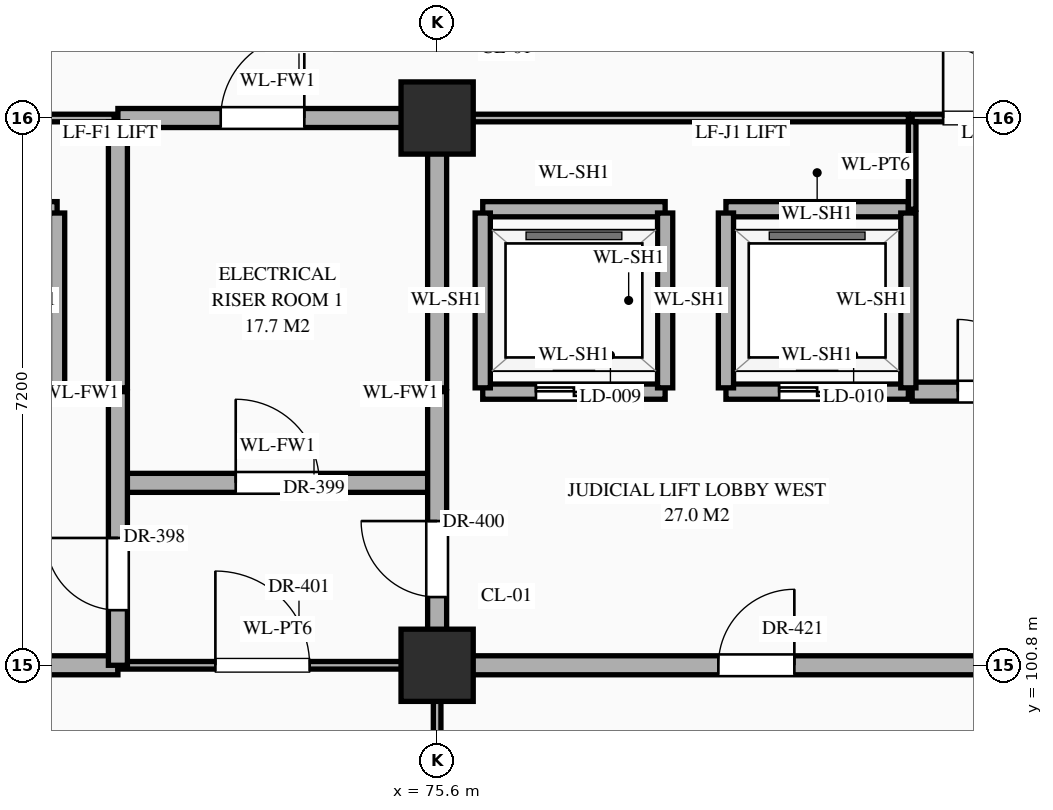
"""IFC4 building model, lengths in metres.
Left out: names, types, materials, properties, quantities, classifications, styles, units other than length and angle.
Written with IfcOpenShell. Run it as: python <this file> out.ifc"""

import sys

from ifc_helpers import new_model, si_unit, direction, frame, frame_2d, origin, origin_2d, place, context, subcontext, project, spatial, rectangle, extrude, element, fill, save


model = new_model("IFC4")
c1 = context("Model", 3, precision=1e-05, world=origin(), true_north=direction((0.0, 1.0)))
c2 = subcontext(c1, "Body", "Model", "MODEL_VIEW")
j1 = project(units=[si_unit("LENGTHUNIT", "METRE"), si_unit("PLANEANGLEUNIT", "RADIAN")], contexts=[c1])
p1 = place(None, origin())
s1 = spatial("IfcSite", under=j1, at=p1, CompositionType="ELEMENT")
p2 = place(p1, origin())
s2 = spatial("IfcBuilding", under=s1, at=p2, CompositionType="ELEMENT")
p3 = place(p2, frame((0.0, 0.0, -5.4)))
s3 = spatial("IfcBuildingStorey", under=s2, at=p3, CompositionType="ELEMENT", Elevation=-5.4)
for number, where, z_axis, x_axis in (
    (1, (75.6, 100.8, 0.0), (0.0, 0.0, 1.0), (1.0, 0.0, 0.0)),
    (2, (75.6, 108.0, 0.0), (0.0, 0.0, 1.0), (1.0, 0.0, 0.0)),
):
    element("IfcColumn", number, at=place(p3, frame(where, z_axis=z_axis, x_axis=x_axis)), inside=s3, PredefinedType="COLUMN", context=c2, shape_type="SweptSolid", body=[
        extrude(rectangle(XDim=0.95, YDim=0.95, at=origin_2d()), origin(), (0.0, 0.0, 1.0), 5.4),
    ])
p4 = place(p3, frame((58.8, 100.8, 0.0), z_axis=(0.0, 0.0, 1.0), x_axis=(1.0, 0.0, 0.0)))
e3 = element("IfcWall", 3, at=p4, inside=s3, PredefinedType="STANDARD", context=c2, shape_type="SweptSolid", body=[
    extrude(rectangle(XDim=12.6, YDim=0.25, at=frame_2d((6.3, 0.0))), origin(), (0.0, 0.0, 1.0), 4.25),
])
p5 = place(p4, frame((3.725, 0.0, 0.0)))
e4 = element("IfcOpeningElement", 4, at=p5, cuts=e3, PredefinedType="OPENING", context=c2, shape_type="SweptSolid", body=[
    extrude(rectangle(XDim=0.95, YDim=2.15, at=frame_2d((0.475, 1.075))), frame((0.0, 0.137, 0.0), z_axis=(0.0, -1.0, 0.0), x_axis=(1.0, 0.0, 0.0)), (0.0, 0.0, 1.0), 0.274),
])
p6 = place(p3, frame((71.4, 100.8, 0.0), z_axis=(0.0, 0.0, 1.0), x_axis=(1.0, 0.0, 0.0)))
e5 = element("IfcWall", 5, at=p6, inside=s3, PredefinedType="STANDARD", context=c2, shape_type="SweptSolid", body=[
    extrude(rectangle(XDim=4.2, YDim=0.1, at=frame_2d((2.1, 0.0))), origin(), (0.0, 0.0, 1.0), 4.25),
])
p7 = place(p6, frame((1.282, 0.0, 0.0)))
e6 = element("IfcOpeningElement", 6, at=p7, cuts=e5, PredefinedType="OPENING", context=c2, shape_type="SweptSolid", body=[
    extrude(rectangle(XDim=1.24, YDim=2.3, at=frame_2d((0.62, 1.15))), frame((0.0, 0.062, 0.0), z_axis=(0.0, -1.0, 0.0), x_axis=(1.0, 0.0, 0.0)), (0.0, 0.0, 1.0), 0.124),
])
p8 = place(p3, frame((75.6, 100.8, 0.0), z_axis=(0.0, 0.0, 1.0), x_axis=(1.0, 0.0, 0.0)))
e7 = element("IfcWall", 7, at=p8, inside=s3, PredefinedType="STANDARD", context=c2, shape_type="SweptSolid", body=[
    extrude(rectangle(XDim=16.8, YDim=0.25, at=frame_2d((8.4, 0.0))), origin(), (0.0, 0.0, 1.0), 4.25),
])
p9 = place(p8, frame((3.7, 0.0, 0.0)))
e8 = element("IfcOpeningElement", 8, at=p9, cuts=e7, PredefinedType="OPENING", context=c2, shape_type="SweptSolid", body=[
    extrude(rectangle(XDim=1.0, YDim=2.2, at=frame_2d((0.5, 1.1))), frame((0.0, 0.137, 0.0), z_axis=(0.0, -1.0, 0.0), x_axis=(1.0, 0.0, 0.0)), (0.0, 0.0, 1.0), 0.274),
])
p10 = place(p8, frame((9.748, 0.0, 0.0)))
e9 = element("IfcOpeningElement", 9, at=p10, cuts=e7, PredefinedType="OPENING", context=c2, shape_type="SweptSolid", body=[
    extrude(rectangle(XDim=1.1, YDim=2.2, at=frame_2d((0.55, 1.1))), frame((0.0, 0.137, 0.0), z_axis=(0.0, -1.0, 0.0), x_axis=(1.0, 0.0, 0.0)), (0.0, 0.0, 1.0), 0.274),
])
p11 = place(p8, frame((12.5, 0.0, 0.0)))
e10 = element("IfcOpeningElement", 10, at=p11, cuts=e7, PredefinedType="OPENING", context=c2, shape_type="SweptSolid", body=[
    extrude(rectangle(XDim=1.0, YDim=2.2, at=frame_2d((0.5, 1.1))), frame((0.0, 0.137, 0.0), z_axis=(0.0, -1.0, 0.0), x_axis=(1.0, 0.0, 0.0)), (0.0, 0.0, 1.0), 0.274),
])
p12 = place(p8, frame((14.827, 0.0, 0.0)))
e11 = element("IfcOpeningElement", 11, at=p12, cuts=e7, PredefinedType="OPENING", context=c2, shape_type="SweptSolid", body=[
    extrude(rectangle(XDim=0.95, YDim=2.15, at=frame_2d((0.475, 1.075))), frame((0.0, 0.137, 0.0), z_axis=(0.0, -1.0, 0.0), x_axis=(1.0, 0.0, 0.0)), (0.0, 0.0, 1.0), 0.274),
])
p13 = place(p3, frame((71.4, 103.2, 0.0), z_axis=(0.0, 0.0, 1.0), x_axis=(1.0, 0.0, 0.0)))
e12 = element("IfcWall", 12, at=p13, inside=s3, PredefinedType="STANDARD", context=c2, shape_type="SweptSolid", body=[
    extrude(rectangle(XDim=4.2, YDim=0.25, at=frame_2d((2.1, 0.0))), origin(), (0.0, 0.0, 1.0), 5.1),
])
p14 = place(p13, frame((1.55, 0.0, 0.0)))
e13 = element("IfcOpeningElement", 13, at=p14, cuts=e12, PredefinedType="OPENING", context=c2, shape_type="SweptSolid", body=[
    extrude(rectangle(XDim=1.1, YDim=2.2, at=frame_2d((0.55, 1.1))), frame((0.0, 0.137, 0.0), z_axis=(0.0, -1.0, 0.0), x_axis=(1.0, 0.0, 0.0)), (0.0, 0.0, 1.0), 0.274),
])
p15 = place(p3, frame((67.6, 104.4, 0.0), z_axis=(0.0, 0.0, 1.0), x_axis=(1.0, 0.0, 0.0)))
e14 = element("IfcWall", 14, at=p15, inside=s3, PredefinedType="STANDARD", context=c2, shape_type="SweptSolid", body=[
    extrude(rectangle(XDim=3.0, YDim=0.2, at=frame_2d((1.5, 0.0))), origin(), (0.0, 0.0, 1.0), 5.1),
])
p16 = place(p15, frame((0.9, 0.0, 0.0)))
e15 = element("IfcOpeningElement", 15, at=p16, cuts=e14, PredefinedType="OPENING", context=c2, shape_type="SweptSolid", body=[
    extrude(rectangle(XDim=1.2, YDim=2.15, at=frame_2d((0.6, 1.075))), frame((0.0, 0.112, 0.0), z_axis=(0.0, -1.0, 0.0), x_axis=(1.0, 0.0, 0.0)), (0.0, 0.0, 1.0), 0.224),
])
p17 = place(p3, frame((76.2, 104.4, 0.0), z_axis=(0.0, 0.0, 1.0), x_axis=(1.0, 0.0, 0.0)))
e16 = element("IfcWall", 16, at=p17, inside=s3, PredefinedType="STANDARD", context=c2, shape_type="SweptSolid", body=[
    extrude(rectangle(XDim=2.4, YDim=0.2, at=frame_2d((1.2, 0.0))), origin(), (0.0, 0.0, 1.0), 5.1),
])
p18 = place(p17, frame((0.7, 0.0, 0.0)))
e17 = element("IfcOpeningElement", 17, at=p18, cuts=e16, PredefinedType="OPENING", context=c2, shape_type="SweptSolid", body=[
    extrude(rectangle(XDim=1.0, YDim=2.15, at=frame_2d((0.5, 1.075))), frame((0.0, 0.112, 0.0), z_axis=(0.0, -1.0, 0.0), x_axis=(1.0, 0.0, 0.0)), (0.0, 0.0, 1.0), 0.224),
])
p19 = place(p3, frame((79.4, 104.4, 0.0), z_axis=(0.0, 0.0, 1.0), x_axis=(1.0, 0.0, 0.0)))
e18 = element("IfcWall", 18, at=p19, inside=s3, PredefinedType="STANDARD", context=c2, shape_type="SweptSolid", body=[
    extrude(rectangle(XDim=2.4, YDim=0.2, at=frame_2d((1.2, 0.0))), origin(), (0.0, 0.0, 1.0), 5.1),
])
p20 = place(p19, frame((0.7, 0.0, 0.0)))
e19 = element("IfcOpeningElement", 19, at=p20, cuts=e18, PredefinedType="OPENING", context=c2, shape_type="SweptSolid", body=[
    extrude(rectangle(XDim=1.0, YDim=2.15, at=frame_2d((0.5, 1.075))), frame((0.0, 0.112, 0.0), z_axis=(0.0, -1.0, 0.0), x_axis=(1.0, 0.0, 0.0)), (0.0, 0.0, 1.0), 0.224),
])
p21 = place(p3, frame((81.85, 104.4, 0.0), z_axis=(0.0, 0.0, 1.0), x_axis=(1.0, 0.0, 0.0)))
e20 = element("IfcWall", 20, at=p21, inside=s3, PredefinedType="STANDARD", context=c2, shape_type="SweptSolid", body=[
    extrude(rectangle(XDim=4.3, YDim=0.25, at=frame_2d((2.15, 0.0))), origin(), (0.0, 0.0, 1.0), 5.1),
])
p22 = place(p21, frame((0.6, 0.0, 0.0)))
e21 = element("IfcOpeningElement", 21, at=p22, cuts=e20, PredefinedType="OPENING", context=c2, shape_type="SweptSolid", body=[
    extrude(rectangle(XDim=0.95, YDim=2.15, at=frame_2d((0.475, 1.075))), frame((0.0, 0.137, 0.0), z_axis=(0.0, -1.0, 0.0), x_axis=(1.0, 0.0, 0.0)), (0.0, 0.0, 1.0), 0.274),
])
p23 = place(p21, frame((2.675, 0.0, 0.0)))
e22 = element("IfcOpeningElement", 22, at=p23, cuts=e20, PredefinedType="OPENING", context=c2, shape_type="SweptSolid", body=[
    extrude(rectangle(XDim=1.1, YDim=2.2, at=frame_2d((0.55, 1.1))), frame((0.0, 0.137, 0.0), z_axis=(0.0, -1.0, 0.0), x_axis=(1.0, 0.0, 0.0)), (0.0, 0.0, 1.0), 0.274),
])
p24 = place(p3, frame((67.6, 106.8, 0.0), z_axis=(0.0, 0.0, 1.0), x_axis=(1.0, 0.0, 0.0)))
e23 = element("IfcWall", 23, at=p24, inside=s3, PredefinedType="STANDARD", context=c2, shape_type="SweptSolid", body=[
    extrude(rectangle(XDim=3.0, YDim=0.2, at=frame_2d((1.5, 0.0))), origin(), (0.0, 0.0, 1.0), 5.1),
])
for number, where, z_axis, x_axis in (
    (24, (76.2, 106.8, 0.0), (0.0, 0.0, 1.0), (1.0, 0.0, 0.0)),
    (25, (79.4, 106.8, 0.0), (0.0, 0.0, 1.0), (1.0, 0.0, 0.0)),
):
    element("IfcWall", number, at=place(p3, frame(where, z_axis=z_axis, x_axis=x_axis)), inside=s3, PredefinedType="STANDARD", context=c2, shape_type="SweptSolid", body=[
        extrude(rectangle(XDim=2.4, YDim=0.2, at=frame_2d((1.2, 0.0))), origin(), (0.0, 0.0, 1.0), 5.1),
    ])
p25 = place(p3, frame((67.25, 108.0, 0.0), z_axis=(0.0, 0.0, 1.0), x_axis=(1.0, 0.0, 0.0)))
e26 = element("IfcWall", 26, at=p25, inside=s3, PredefinedType="STANDARD", context=c2, shape_type="SweptSolid", body=[
    extrude(rectangle(XDim=4.1, YDim=0.1, at=frame_2d((2.05, 0.0))), origin(), (0.0, 0.0, 1.0), 4.25),
])
p26 = place(p3, frame((71.4, 108.0, 0.0), z_axis=(0.0, 0.0, 1.0), x_axis=(1.0, 0.0, 0.0)))
e27 = element("IfcWall", 27, at=p26, inside=s3, PredefinedType="STANDARD", context=c2, shape_type="SweptSolid", body=[
    extrude(rectangle(XDim=4.2, YDim=0.25, at=frame_2d((2.1, 0.0))), origin(), (0.0, 0.0, 1.0), 4.25),
])
p27 = place(p26, frame((1.353, 0.0, 0.0)))
e28 = element("IfcOpeningElement", 28, at=p27, cuts=e27, PredefinedType="OPENING", context=c2, shape_type="SweptSolid", body=[
    extrude(rectangle(XDim=1.1, YDim=2.2, at=frame_2d((0.55, 1.1))), frame((0.0, 0.137, 0.0), z_axis=(0.0, -1.0, 0.0), x_axis=(1.0, 0.0, 0.0)), (0.0, 0.0, 1.0), 0.274),
])
p28 = place(p3, frame((75.65, 108.0, 0.0), z_axis=(0.0, 0.0, 1.0), x_axis=(1.0, 0.0, 0.0)))
e29 = element("IfcWall", 29, at=p28, inside=s3, PredefinedType="STANDARD", context=c2, shape_type="SweptSolid", body=[
    extrude(rectangle(XDim=6.15, YDim=0.1, at=frame_2d((3.075, 0.0))), origin(), (0.0, 0.0, 1.0), 4.25),
])
p29 = place(p3, frame((81.85, 108.0, 0.0), z_axis=(0.0, 0.0, 1.0), x_axis=(1.0, 0.0, 0.0)))
e30 = element("IfcWall", 30, at=p29, inside=s3, PredefinedType="STANDARD", context=c2, shape_type="SweptSolid", body=[
    extrude(rectangle(XDim=4.3, YDim=0.1, at=frame_2d((2.15, 0.0))), origin(), (0.0, 0.0, 1.0), 4.25),
])
p30 = place(p29, frame((0.407, 0.0, 0.0)))
e31 = element("IfcOpeningElement", 31, at=p30, cuts=e30, PredefinedType="OPENING", context=c2, shape_type="SweptSolid", body=[
    extrude(rectangle(XDim=0.94, YDim=2.3, at=frame_2d((0.47, 1.15))), frame((0.0, 0.062, 0.0), z_axis=(0.0, -1.0, 0.0), x_axis=(1.0, 0.0, 0.0)), (0.0, 0.0, 1.0), 0.124),
])
p31 = place(p29, frame((2.933, 0.0, 0.0)))
e32 = element("IfcOpeningElement", 32, at=p31, cuts=e30, PredefinedType="OPENING", context=c2, shape_type="SweptSolid", body=[
    extrude(rectangle(XDim=0.98, YDim=2.35, at=frame_2d((0.49, 1.175))), frame((0.0, 0.062, 0.0), z_axis=(0.0, -1.0, 0.0), x_axis=(1.0, 0.0, 0.0)), (0.0, 0.0, 1.0), 0.124),
])
p32 = place(p3, frame((70.6, 104.45, 0.0), z_axis=(0.0, 0.0, 1.0), x_axis=(0.0, 1.0, 0.0)))
e33 = element("IfcWall", 33, at=p32, inside=s3, PredefinedType="STANDARD", context=c2, shape_type="SweptSolid", body=[
    extrude(rectangle(XDim=2.3, YDim=0.2, at=frame_2d((1.15, 0.0))), origin(), (0.0, 0.0, 1.0), 5.1),
])
p33 = place(p3, frame((71.4, 100.8, 0.0), z_axis=(0.0, 0.0, 1.0), x_axis=(0.0, 1.0, 0.0)))
e34 = element("IfcWall", 34, at=p33, inside=s3, PredefinedType="STANDARD", context=c2, shape_type="SweptSolid", body=[
    extrude(rectangle(XDim=3.6, YDim=0.25, at=frame_2d((1.8, 0.0))), origin(), (0.0, 0.0, 1.0), 4.55),
])
p34 = place(p33, frame((0.725, 0.0, 0.0)))
e35 = element("IfcOpeningElement", 35, at=p34, cuts=e34, PredefinedType="OPENING", context=c2, shape_type="SweptSolid", body=[
    extrude(rectangle(XDim=0.95, YDim=2.15, at=frame_2d((0.475, 1.075))), frame((0.0, 0.137, 0.0), z_axis=(0.0, -1.0, 0.0), x_axis=(1.0, 0.0, 0.0)), (0.0, 0.0, 1.0), 0.274),
])
p35 = place(p3, frame((71.4, 104.45, 0.0), z_axis=(0.0, 0.0, 1.0), x_axis=(0.0, 1.0, 0.0)))
e36 = element("IfcWall", 36, at=p35, inside=s3, PredefinedType="STANDARD", context=c2, shape_type="SweptSolid", body=[
    extrude(rectangle(XDim=3.5, YDim=0.25, at=frame_2d((1.75, 0.0))), origin(), (0.0, 0.0, 1.0), 4.55),
])
p36 = place(p3, frame((75.6, 96.0, 0.0), z_axis=(0.0, 0.0, 1.0), x_axis=(0.0, 1.0, 0.0)))
e37 = element("IfcWall", 37, at=p36, inside=s3, PredefinedType="STANDARD", context=c2, shape_type="SweptSolid", body=[
    extrude(rectangle(XDim=4.8, YDim=0.1, at=frame_2d((2.4, 0.0))), origin(), (0.0, 0.0, 1.0), 4.35),
])
p37 = place(p3, frame((75.6, 100.8, 0.0), z_axis=(0.0, 0.0, 1.0), x_axis=(0.0, 1.0, 0.0)))
e38 = element("IfcWall", 38, at=p37, inside=s3, PredefinedType="STANDARD", context=c2, shape_type="SweptSolid", body=[
    extrude(rectangle(XDim=3.6, YDim=0.25, at=frame_2d((1.8, 0.0))), origin(), (0.0, 0.0, 1.0), 4.35),
])
p38 = place(p37, frame((0.897, 0.0, 0.0)))
e39 = element("IfcOpeningElement", 39, at=p38, cuts=e38, PredefinedType="OPENING", context=c2, shape_type="SweptSolid", body=[
    extrude(rectangle(XDim=1.0, YDim=2.2, at=frame_2d((0.5, 1.1))), frame((0.0, 0.137, 0.0), z_axis=(0.0, -1.0, 0.0), x_axis=(1.0, 0.0, 0.0)), (0.0, 0.0, 1.0), 0.274),
])
p39 = place(p3, frame((75.6, 104.45, 0.0), z_axis=(0.0, 0.0, 1.0), x_axis=(0.0, 1.0, 0.0)))
e40 = element("IfcWall", 40, at=p39, inside=s3, PredefinedType="STANDARD", context=c2, shape_type="SweptSolid", body=[
    extrude(rectangle(XDim=3.5, YDim=0.25, at=frame_2d((1.75, 0.0))), origin(), (0.0, 0.0, 1.0), 4.35),
])
for number, where, z_axis, x_axis in (
    (41, (76.2, 104.45, 0.0), (0.0, 0.0, 1.0), (0.0, 1.0, 0.0)),
    (42, (78.6, 104.45, 0.0), (0.0, 0.0, 1.0), (0.0, 1.0, 0.0)),
    (43, (79.4, 104.45, 0.0), (0.0, 0.0, 1.0), (0.0, 1.0, 0.0)),
    (44, (81.8, 104.45, 0.0), (0.0, 0.0, 1.0), (0.0, 1.0, 0.0)),
):
    element("IfcWall", number, at=place(p3, frame(where, z_axis=z_axis, x_axis=x_axis)), inside=s3, PredefinedType="STANDARD", context=c2, shape_type="SweptSolid", body=[
        extrude(rectangle(XDim=2.3, YDim=0.2, at=frame_2d((1.15, 0.0))), origin(), (0.0, 0.0, 1.0), 5.1),
    ])
p40 = place(p3, frame((81.85, 106.8, 0.0), z_axis=(0.0, 0.0, 1.0), x_axis=(0.0, 1.0, 0.0)))
e45 = element("IfcWall", 45, at=p40, inside=s3, PredefinedType="STANDARD", context=c2, shape_type="SweptSolid", body=[
    extrude(rectangle(XDim=1.15, YDim=0.1, at=frame_2d((0.575, 0.0))), origin(), (0.0, 0.0, 1.0), 5.1),
])
p41 = place(p18, origin())
e46 = element("IfcDoor", 46, at=p41, inside=s3, OperationType="DOUBLE_DOOR_SLIDING", PredefinedType="DOOR", context=c2, shape_type="SweptSolid", body=[
    extrude(rectangle(XDim=1.0, YDim=2.15, at=frame_2d((0.5, 1.075))), frame((0.0, 0.025, 0.0), z_axis=(0.0, -1.0, 0.0), x_axis=(1.0, 0.0, 0.0)), (0.0, 0.0, 1.0), 0.05),
])
fill(e17, e46)
p42 = place(p20, origin())
e47 = element("IfcDoor", 47, at=p42, inside=s3, OperationType="DOUBLE_DOOR_SLIDING", PredefinedType="DOOR", context=c2, shape_type="SweptSolid", body=[
    extrude(rectangle(XDim=1.0, YDim=2.15, at=frame_2d((0.5, 1.075))), frame((0.0, 0.025, 0.0), z_axis=(0.0, -1.0, 0.0), x_axis=(1.0, 0.0, 0.0)), (0.0, 0.0, 1.0), 0.05),
])
fill(e19, e47)
p43 = place(p34, origin())
e48 = element("IfcDoor", 48, at=p43, inside=s3, OperationType="SINGLE_SWING_RIGHT", PredefinedType="DOOR", context=c2, shape_type="SweptSolid", body=[
    extrude(rectangle(XDim=0.95, YDim=2.15, at=frame_2d((0.475, 1.075))), frame((0.0, 0.025, 0.0), z_axis=(0.0, -1.0, 0.0), x_axis=(1.0, 0.0, 0.0)), (0.0, 0.0, 1.0), 0.05),
])
fill(e35, e48)
p44 = place(p14, origin())
e49 = element("IfcDoor", 49, at=p44, inside=s3, OperationType="SINGLE_SWING_LEFT", PredefinedType="DOOR", context=c2, shape_type="SweptSolid", body=[
    extrude(rectangle(XDim=1.1, YDim=2.2, at=frame_2d((0.55, 1.1))), frame((0.0, 0.025, 0.0), z_axis=(0.0, -1.0, 0.0), x_axis=(1.0, 0.0, 0.0)), (0.0, 0.0, 1.0), 0.05),
])
fill(e13, e49)
p45 = place(p38, origin())
e50 = element("IfcDoor", 50, at=p45, inside=s3, OperationType="SINGLE_SWING_RIGHT", PredefinedType="DOOR", context=c2, shape_type="SweptSolid", body=[
    extrude(rectangle(XDim=1.0, YDim=2.2, at=frame_2d((0.5, 1.1))), frame((0.0, 0.025, 0.0), z_axis=(0.0, -1.0, 0.0), x_axis=(1.0, 0.0, 0.0)), (0.0, 0.0, 1.0), 0.05),
])
fill(e39, e50)
p46 = place(p7, origin())
e51 = element("IfcDoor", 51, at=p46, inside=s3, OperationType="SINGLE_SWING_LEFT", PredefinedType="DOOR", context=c2, shape_type="SweptSolid", body=[
    extrude(rectangle(XDim=1.24, YDim=2.3, at=frame_2d((0.62, 1.15))), frame((0.0, 0.025, 0.0), z_axis=(0.0, -1.0, 0.0), x_axis=(1.0, 0.0, 0.0)), (0.0, 0.0, 1.0), 0.05),
])
fill(e6, e51)
p47 = place(p27, origin())
e52 = element("IfcDoor", 52, at=p47, inside=s3, OperationType="SINGLE_SWING_RIGHT", PredefinedType="DOOR", context=c2, shape_type="SweptSolid", body=[
    extrude(rectangle(XDim=1.1, YDim=2.2, at=frame_2d((0.55, 1.1))), frame((0.0, 0.025, 0.0), z_axis=(0.0, -1.0, 0.0), x_axis=(1.0, 0.0, 0.0)), (0.0, 0.0, 1.0), 0.05),
])
fill(e28, e52)
p48 = place(p9, origin())
e53 = element("IfcDoor", 53, at=p48, inside=s3, OperationType="SINGLE_SWING_RIGHT", PredefinedType="DOOR", context=c2, shape_type="SweptSolid", body=[
    extrude(rectangle(XDim=1.0, YDim=2.2, at=frame_2d((0.5, 1.1))), frame((0.0, 0.025, 0.0), z_axis=(0.0, -1.0, 0.0), x_axis=(1.0, 0.0, 0.0)), (0.0, 0.0, 1.0), 0.05),
])
fill(e8, e53)
p49 = place(p22, origin())
e54 = element("IfcDoor", 54, at=p49, inside=s3, OperationType="SINGLE_SWING_LEFT", PredefinedType="DOOR", context=c2, shape_type="SweptSolid", body=[
    extrude(rectangle(XDim=0.95, YDim=2.15, at=frame_2d((0.475, 1.075))), frame((0.0, 0.025, 0.0), z_axis=(0.0, -1.0, 0.0), x_axis=(1.0, 0.0, 0.0)), (0.0, 0.0, 1.0), 0.05),
])
fill(e21, e54)
p50 = place(p30, origin())
e55 = element("IfcDoor", 55, at=p50, inside=s3, OperationType="SINGLE_SWING_LEFT", PredefinedType="DOOR", context=c2, shape_type="SweptSolid", body=[
    extrude(rectangle(XDim=0.94, YDim=2.3, at=frame_2d((0.47, 1.15))), frame((0.0, 0.025, 0.0), z_axis=(0.0, -1.0, 0.0), x_axis=(1.0, 0.0, 0.0)), (0.0, 0.0, 1.0), 0.05),
])
fill(e31, e55)
save(model, sys.argv[1])
